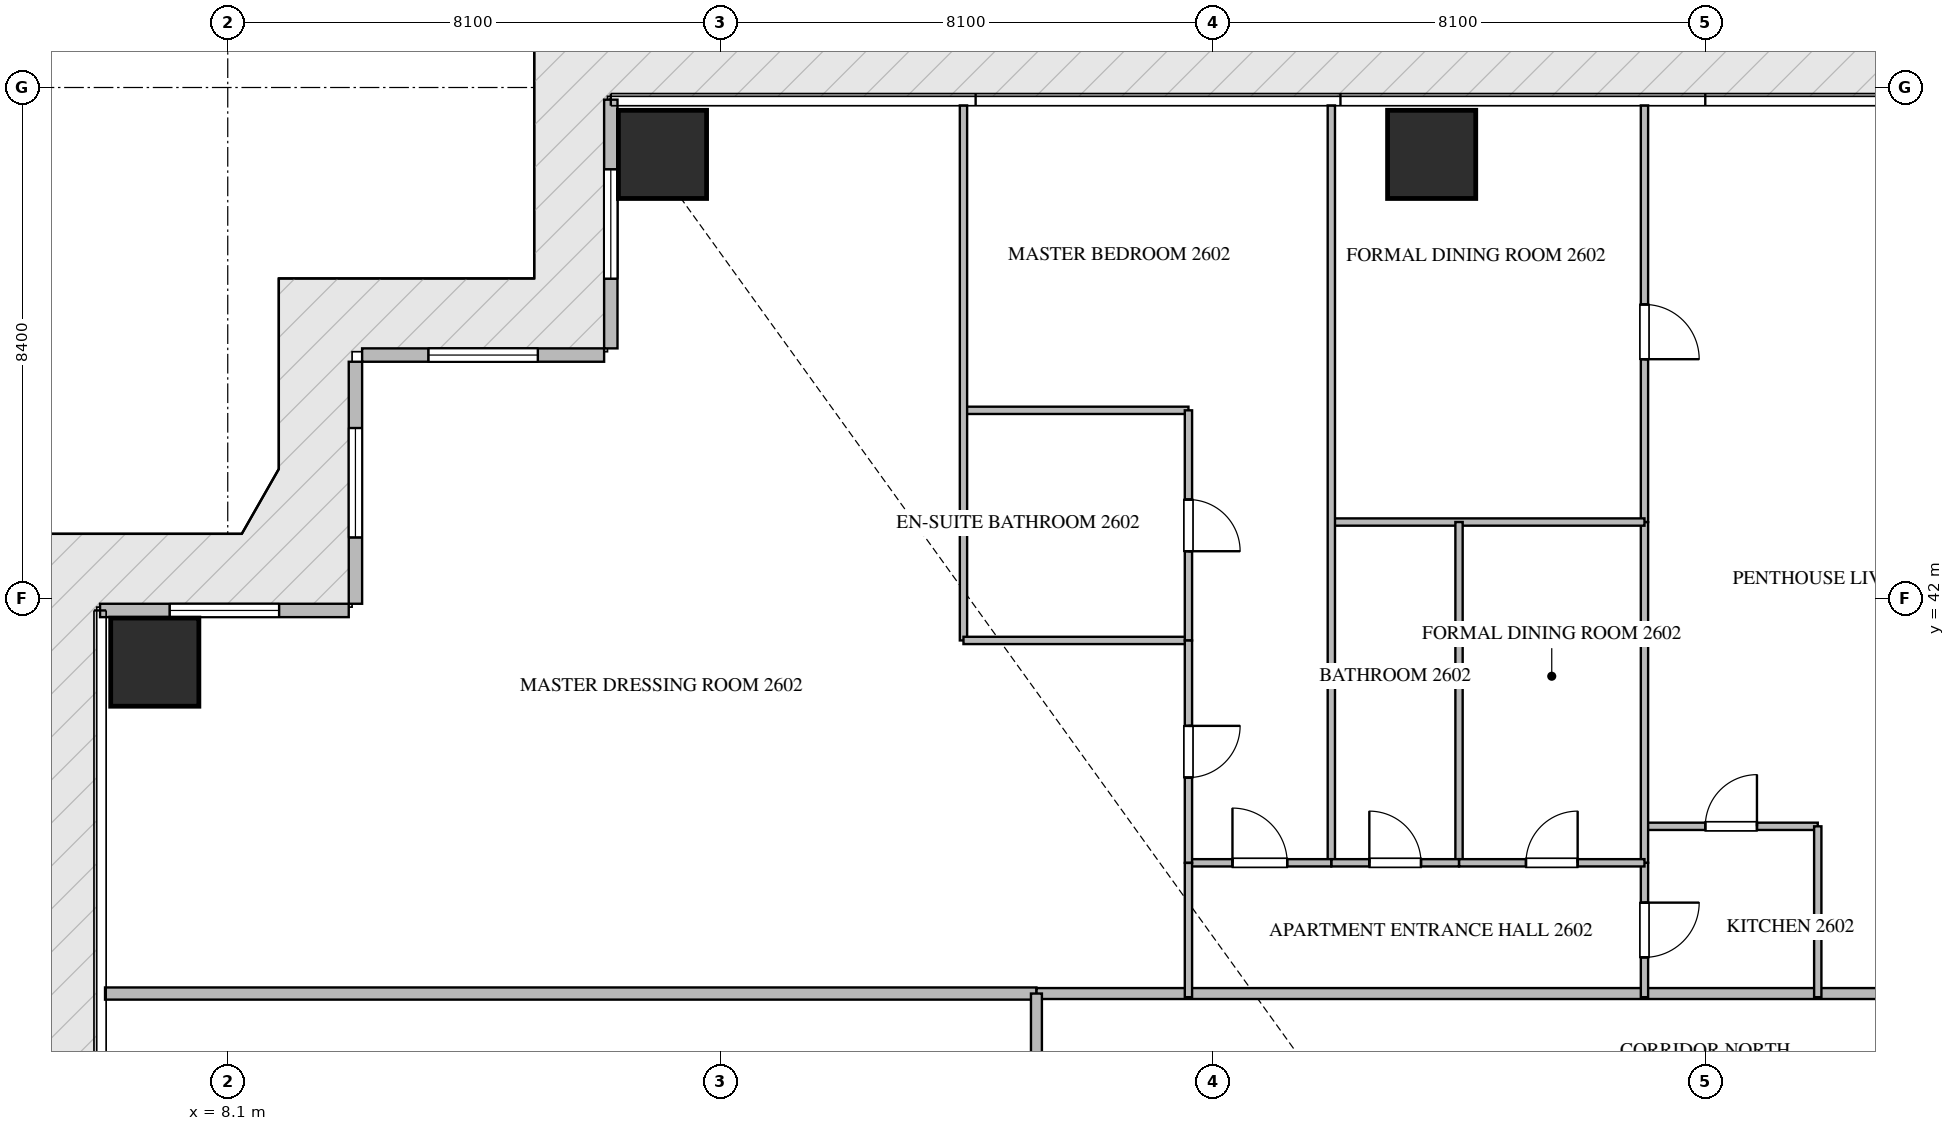
"""IFC4 building model, lengths in metres.
Left out: names, types, materials, properties, quantities, classifications, styles, units other than length and angle.
Written with IfcOpenShell. Run it as: python <this file> out.ifc"""

import sys

from ifc_helpers import new_model, si_unit, direction, frame, frame_2d, origin, origin_2d, place, context, subcontext, project, spatial, rectangle, extrude, source, transform, mapped, element, fill, save


model = new_model("IFC4")
c1 = context("Model", 3, precision=1e-05, world=origin(), true_north=direction((0.0, 1.0)))
c2 = subcontext(c1, "Body", "Model", "MODEL_VIEW")
j1 = project(units=[si_unit("LENGTHUNIT", "METRE"), si_unit("PLANEANGLEUNIT", "RADIAN")], contexts=[c1])
p1 = place(None, origin())
s1 = spatial("IfcSite", under=j1, at=p1, CompositionType="ELEMENT")
p2 = place(p1, origin())
s2 = spatial("IfcBuilding", under=s1, at=p2, CompositionType="ELEMENT")
p3 = place(p2, frame((0.0, 0.0, 105.45)))
s3 = spatial("IfcBuildingStorey", under=s2, at=p3, CompositionType="ELEMENT", Elevation=105.45)
m1 = source(origin(), c2, "Body", "SweptSolid", [
    extrude(rectangle(XDim=1.45, YDim=1.45, at=origin_2d()), origin(), (0.0, 0.0, 1.0), 3.65),
])
for number, where, z_axis, x_axis in (
    (1, (15.25, 49.3, -0.26), (0.0, 0.0, 1.0), (1.0, 0.0, 0.0)),
    (2, (27.9, 49.3, -0.26), (0.0, 0.0, 1.0), (1.0, 0.0, 0.0)),
    (3, (6.9, 40.95, -0.26), (0.0, 0.0, 1.0), (1.0, 0.0, 0.0)),
):
    element("IfcColumn", number, at=place(p3, frame(where, z_axis=z_axis, x_axis=x_axis)), inside=s3, PredefinedType="COLUMN", context=c2, shape_type="MappedRepresentation", body=[
        mapped(m1, transform((0.0, 0.0, 0.0), scale=1.0)),
    ])
p4 = place(p3, frame((14.4, 50.2, 0.0), z_axis=(0.0, 0.0, 1.0), x_axis=(0.0, -1.0, 0.0)))
e4 = element("IfcWall", 4, at=p4, inside=s3, PredefinedType="ELEMENTEDWALL", context=c2, shape_type="SweptSolid", body=[
    extrude(rectangle(XDim=4.09, YDim=0.22, at=frame_2d((2.045, 0.0))), origin(), (0.0, 0.0, 1.0), 3.375),
])
p5 = place(p4, frame((1.145, 0.0, 0.65)))
e5 = element("IfcOpeningElement", 5, at=p5, cuts=e4, PredefinedType="OPENING", context=c2, shape_type="SweptSolid", body=[
    extrude(rectangle(XDim=1.8, YDim=2.1, at=frame_2d((0.9, 1.05))), frame((0.0, 0.12, 0.0), z_axis=(0.0, -1.0, 0.0), x_axis=(1.0, 0.0, 0.0)), (0.0, 0.0, 1.0), 0.24),
])
p6 = place(p3, frame((14.29, 46.0, 0.0), z_axis=(0.0, 0.0, 1.0), x_axis=(-1.0, 0.0, 0.0)))
e6 = element("IfcWall", 6, at=p6, inside=s3, PredefinedType="ELEMENTEDWALL", context=c2, shape_type="SweptSolid", body=[
    extrude(rectangle(XDim=3.98, YDim=0.22, at=frame_2d((1.99, 0.0))), origin(), (0.0, 0.0, 1.0), 3.375),
])
p7 = place(p6, frame((1.09, 0.0, 0.65)))
e7 = element("IfcOpeningElement", 7, at=p7, cuts=e6, PredefinedType="OPENING", context=c2, shape_type="SweptSolid", body=[
    extrude(rectangle(XDim=1.8, YDim=2.1, at=frame_2d((0.9, 1.05))), frame((0.0, 0.12, 0.0), z_axis=(0.0, -1.0, 0.0), x_axis=(1.0, 0.0, 0.0)), (0.0, 0.0, 1.0), 0.24),
])
p8 = place(p3, frame((10.2, 45.89, 0.0), z_axis=(0.0, 0.0, 1.0), x_axis=(0.0, -1.0, 0.0)))
e8 = element("IfcWall", 8, at=p8, inside=s3, PredefinedType="ELEMENTEDWALL", context=c2, shape_type="SweptSolid", body=[
    extrude(rectangle(XDim=3.98, YDim=0.22, at=frame_2d((1.99, 0.0))), origin(), (0.0, 0.0, 1.0), 3.375),
])
p9 = place(p8, frame((1.09, 0.0, 0.65)))
e9 = element("IfcOpeningElement", 9, at=p9, cuts=e8, PredefinedType="OPENING", context=c2, shape_type="SweptSolid", body=[
    extrude(rectangle(XDim=1.8, YDim=2.1, at=frame_2d((0.9, 1.05))), frame((0.0, 0.12, 0.0), z_axis=(0.0, -1.0, 0.0), x_axis=(1.0, 0.0, 0.0)), (0.0, 0.0, 1.0), 0.24),
])
p10 = place(p3, frame((10.09, 41.8, 0.0), z_axis=(0.0, 0.0, 1.0), x_axis=(-1.0, 0.0, 0.0)))
e10 = element("IfcWall", 10, at=p10, inside=s3, PredefinedType="ELEMENTEDWALL", context=c2, shape_type="SweptSolid", body=[
    extrude(rectangle(XDim=4.09, YDim=0.22, at=frame_2d((2.045, 0.0))), origin(), (0.0, 0.0, 1.0), 3.375),
])
p11 = place(p10, frame((1.145, 0.0, 0.65)))
e11 = element("IfcOpeningElement", 11, at=p11, cuts=e10, PredefinedType="OPENING", context=c2, shape_type="SweptSolid", body=[
    extrude(rectangle(XDim=1.8, YDim=2.1, at=frame_2d((0.9, 1.05))), frame((0.0, 0.12, 0.0), z_axis=(0.0, -1.0, 0.0), x_axis=(1.0, 0.0, 0.0)), (0.0, 0.0, 1.0), 0.24),
])
p12 = place(p3, frame((6.082, 35.5, 0.0), z_axis=(0.0, 0.0, 1.0), x_axis=(1.0, 0.0, 0.0)))
e12 = element("IfcWall", 12, at=p12, inside=s3, PredefinedType="PARTITIONING", context=c2, shape_type="SweptSolid", body=[
    extrude(rectangle(XDim=15.318, YDim=0.2, at=frame_2d((7.659, 0.0))), origin(), (0.0, 0.0, 1.0), 3.39),
])
p13 = place(p3, frame((21.402, 35.5, 0.0), z_axis=(0.0, 0.0, 1.0), x_axis=(1.0, 0.0, 0.0)))
e13 = element("IfcWall", 13, at=p13, inside=s3, PredefinedType="PARTITIONING", context=c2, shape_type="SweptSolid", body=[
    extrude(rectangle(XDim=21.996, YDim=0.18, at=frame_2d((10.998, 0.0))), origin(), (0.0, 0.0, 1.0), 3.39),
])
p14 = place(p13, frame((15.222, 0.0, 0.0)))
e14 = element("IfcOpeningElement", 14, at=p14, cuts=e13, PredefinedType="OPENING", context=c2, shape_type="SweptSolid", body=[
    extrude(rectangle(XDim=1.0, YDim=2.15, at=frame_2d((0.5, 1.075))), frame((0.0, 0.1, 0.0), z_axis=(0.0, -1.0, 0.0), x_axis=(1.0, 0.0, 0.0)), (0.0, 0.0, 1.0), 0.2),
])
p15 = place(p3, frame((21.4, 14.9, 0.0), z_axis=(0.0, 0.0, 1.0), x_axis=(0.0, 1.0, 0.0)))
e15 = element("IfcWall", 15, at=p15, inside=s3, PredefinedType="PARTITIONING", context=c2, shape_type="SweptSolid", body=[
    extrude(rectangle(XDim=20.6, YDim=0.18, at=frame_2d((10.3, 0.0))), origin(), (0.0, 0.0, 1.0), 3.39),
])
p16 = place(p15, frame((1.82, 0.0, 0.0)))
e16 = element("IfcOpeningElement", 16, at=p16, cuts=e15, PredefinedType="OPENING", context=c2, shape_type="SweptSolid", body=[
    extrude(rectangle(XDim=1.0, YDim=2.15, at=frame_2d((0.5, 1.075))), frame((0.0, 0.1, 0.0), z_axis=(0.0, -1.0, 0.0), x_axis=(1.0, 0.0, 0.0)), (0.0, 0.0, 1.0), 0.2),
])
p17 = place(p15, frame((11.27, 0.0, 0.0)))
e17 = element("IfcOpeningElement", 17, at=p17, cuts=e15, PredefinedType="OPENING", context=c2, shape_type="SweptSolid", body=[
    extrude(rectangle(XDim=1.0, YDim=2.15, at=frame_2d((0.5, 1.075))), frame((0.0, 0.1, 0.0), z_axis=(0.0, -1.0, 0.0), x_axis=(1.0, 0.0, 0.0)), (0.0, 0.0, 1.0), 0.2),
])
p18 = place(p15, frame((17.92, 0.0, 0.0)))
e18 = element("IfcOpeningElement", 18, at=p18, cuts=e15, PredefinedType="OPENING", context=c2, shape_type="SweptSolid", body=[
    extrude(rectangle(XDim=1.0, YDim=2.15, at=frame_2d((0.5, 1.075))), frame((0.0, 0.1, 0.0), z_axis=(0.0, -1.0, 0.0), x_axis=(1.0, 0.0, 0.0)), (0.0, 0.0, 1.0), 0.2),
])
p19 = place(p3, frame((31.4, 38.25, 0.0), z_axis=(0.0, 0.0, 1.0), x_axis=(1.0, 0.0, 0.0)))
e19 = element("IfcWall", 19, at=p19, inside=s3, PredefinedType="PARTITIONING", context=c2, shape_type="SweptSolid", body=[
    extrude(rectangle(XDim=2.85, YDim=0.12, at=frame_2d((1.425, 0.0))), origin(), (0.0, 0.0, 1.0), 3.39),
])
p20 = place(p19, frame((1.0, 0.0, 0.0)))
e20 = element("IfcOpeningElement", 20, at=p20, cuts=e19, PredefinedType="OPENING", context=c2, shape_type="SweptSolid", body=[
    extrude(rectangle(XDim=0.85, YDim=2.1, at=frame_2d((0.425, 1.05))), frame((0.0, 0.07, 0.0), z_axis=(0.0, -1.0, 0.0), x_axis=(1.0, 0.0, 0.0)), (0.0, 0.0, 1.0), 0.14),
])
p21 = place(p3, frame((34.25, 38.25, 0.0), z_axis=(0.0, 0.0, 1.0), x_axis=(0.0, -1.0, 0.0)))
e21 = element("IfcWall", 21, at=p21, inside=s3, PredefinedType="PARTITIONING", context=c2, shape_type="SweptSolid", body=[
    extrude(rectangle(XDim=2.81, YDim=0.12, at=frame_2d((1.405, 0.0))), origin(), (0.0, 0.0, 1.0), 3.39),
])
p22 = place(p3, frame((31.4, 37.65, 0.0), z_axis=(0.0, 0.0, 1.0), x_axis=(0.0, -1.0, 0.0)))
e22 = element("IfcWall", 22, at=p22, inside=s3, PredefinedType="PARTITIONING", context=c2, shape_type="SweptSolid", body=[
    extrude(rectangle(XDim=2.21, YDim=0.12, at=frame_2d((1.105, 0.0))), origin(), (0.0, 0.0, 1.0), 3.39),
])
p23 = place(p22, frame((0.655, 0.0, 0.0)))
e23 = element("IfcOpeningElement", 23, at=p23, cuts=e22, PredefinedType="OPENING", context=c2, shape_type="SweptSolid", body=[
    extrude(rectangle(XDim=0.9, YDim=2.1, at=frame_2d((0.45, 1.05))), frame((0.0, 0.07, 0.0), z_axis=(0.0, -1.0, 0.0), x_axis=(1.0, 0.0, 0.0)), (0.0, 0.0, 1.0), 0.14),
])
p24 = place(p3, frame((31.4, 50.105, 0.0), z_axis=(0.0, 0.0, 1.0), x_axis=(0.0, -1.0, 0.0)))
e24 = element("IfcWall", 24, at=p24, inside=s3, PredefinedType="PARTITIONING", context=c2, shape_type="SweptSolid", body=[
    extrude(rectangle(XDim=6.851, YDim=0.12, at=frame_2d((3.426, 0.0))), origin(), (0.0, 0.0, 1.0), 3.39),
])
p25 = place(p24, frame((3.273, 0.0, 0.0)))
e25 = element("IfcOpeningElement", 25, at=p25, cuts=e24, PredefinedType="OPENING", context=c2, shape_type="SweptSolid", body=[
    extrude(rectangle(XDim=0.9, YDim=2.1, at=frame_2d((0.45, 1.05))), frame((0.0, 0.07, 0.0), z_axis=(0.0, -1.0, 0.0), x_axis=(1.0, 0.0, 0.0)), (0.0, 0.0, 1.0), 0.14),
])
p26 = place(p3, frame((31.4, 43.252, 0.0), z_axis=(0.0, 0.0, 1.0), x_axis=(0.0, -1.0, 0.0)))
e26 = element("IfcWall", 26, at=p26, inside=s3, PredefinedType="PARTITIONING", context=c2, shape_type="SweptSolid", body=[
    extrude(rectangle(XDim=5.6, YDim=0.12, at=frame_2d((2.8, 0.0))), origin(), (0.0, 0.0, 1.0), 3.39),
])
p27 = place(p3, frame((26.25, 43.254, 0.0), z_axis=(0.0, 0.0, 1.0), x_axis=(1.0, 0.0, 0.0)))
e27 = element("IfcWall", 27, at=p27, inside=s3, PredefinedType="PARTITIONING", context=c2, shape_type="SweptSolid", body=[
    extrude(rectangle(XDim=5.15, YDim=0.12, at=frame_2d((2.575, 0.0))), origin(), (0.0, 0.0, 1.0), 3.39),
])
p28 = place(p3, frame((26.25, 50.105, 0.0), z_axis=(0.0, 0.0, 1.0), x_axis=(0.0, -1.0, 0.0)))
e28 = element("IfcWall", 28, at=p28, inside=s3, PredefinedType="PARTITIONING", context=c2, shape_type="SweptSolid", body=[
    extrude(rectangle(XDim=12.455, YDim=0.12, at=frame_2d((6.228, 0.0))), origin(), (0.0, 0.0, 1.0), 3.39),
])
p29 = place(p3, frame((28.35, 43.254, 0.0), z_axis=(0.0, 0.0, 1.0), x_axis=(0.0, -1.0, 0.0)))
e29 = element("IfcWall", 29, at=p29, inside=s3, PredefinedType="PARTITIONING", context=c2, shape_type="SweptSolid", body=[
    extrude(rectangle(XDim=5.604, YDim=0.12, at=frame_2d((2.802, 0.0))), origin(), (0.0, 0.0, 1.0), 3.39),
])
p30 = place(p3, frame((26.25, 37.65, 0.0), z_axis=(0.0, 0.0, 1.0), x_axis=(1.0, 0.0, 0.0)))
e30 = element("IfcWall", 30, at=p30, inside=s3, PredefinedType="PARTITIONING", context=c2, shape_type="SweptSolid", body=[
    extrude(rectangle(XDim=2.1, YDim=0.12, at=frame_2d((1.05, 0.0))), origin(), (0.0, 0.0, 1.0), 3.39),
])
p31 = place(p30, frame((0.625, 0.0, 0.0)))
e31 = element("IfcOpeningElement", 31, at=p31, cuts=e30, PredefinedType="OPENING", context=c2, shape_type="SweptSolid", body=[
    extrude(rectangle(XDim=0.85, YDim=2.1, at=frame_2d((0.425, 1.05))), frame((0.0, 0.07, 0.0), z_axis=(0.0, -1.0, 0.0), x_axis=(1.0, 0.0, 0.0)), (0.0, 0.0, 1.0), 0.14),
])
p32 = place(p3, frame((28.352, 37.65, 0.0), z_axis=(0.0, 0.0, 1.0), x_axis=(1.0, 0.0, 0.0)))
e32 = element("IfcWall", 32, at=p32, inside=s3, PredefinedType="PARTITIONING", context=c2, shape_type="SweptSolid", body=[
    extrude(rectangle(XDim=3.048, YDim=0.12, at=frame_2d((1.524, 0.0))), origin(), (0.0, 0.0, 1.0), 3.39),
])
p33 = place(p32, frame((1.099, 0.0, 0.0)))
e33 = element("IfcOpeningElement", 33, at=p33, cuts=e32, PredefinedType="OPENING", context=c2, shape_type="SweptSolid", body=[
    extrude(rectangle(XDim=0.85, YDim=2.1, at=frame_2d((0.425, 1.05))), frame((0.0, 0.07, 0.0), z_axis=(0.0, -1.0, 0.0), x_axis=(1.0, 0.0, 0.0)), (0.0, 0.0, 1.0), 0.14),
])
p34 = place(p3, frame((23.9, 37.65, 0.0), z_axis=(0.0, 0.0, 1.0), x_axis=(1.0, 0.0, 0.0)))
e34 = element("IfcWall", 34, at=p34, inside=s3, PredefinedType="PARTITIONING", context=c2, shape_type="SweptSolid", body=[
    extrude(rectangle(XDim=2.348, YDim=0.12, at=frame_2d((1.174, 0.0))), origin(), (0.0, 0.0, 1.0), 3.39),
])
p35 = place(p34, frame((0.724, 0.0, 0.0)))
e35 = element("IfcOpeningElement", 35, at=p35, cuts=e34, PredefinedType="OPENING", context=c2, shape_type="SweptSolid", body=[
    extrude(rectangle(XDim=0.9, YDim=2.1, at=frame_2d((0.45, 1.05))), frame((0.0, 0.07, 0.0), z_axis=(0.0, -1.0, 0.0), x_axis=(1.0, 0.0, 0.0)), (0.0, 0.0, 1.0), 0.14),
])
p36 = place(p3, frame((20.2, 45.091, 0.0), z_axis=(0.0, 0.0, 1.0), x_axis=(1.0, 0.0, 0.0)))
e36 = element("IfcWall", 36, at=p36, inside=s3, PredefinedType="PARTITIONING", context=c2, shape_type="SweptSolid", body=[
    extrude(rectangle(XDim=3.7, YDim=0.12, at=frame_2d((1.85, 0.0))), origin(), (0.0, 0.0, 1.0), 3.39),
])
p37 = place(p3, frame((20.2, 50.105, 0.0), z_axis=(0.0, 0.0, 1.0), x_axis=(0.0, -1.0, 0.0)))
e37 = element("IfcWall", 37, at=p37, inside=s3, PredefinedType="PARTITIONING", context=c2, shape_type="SweptSolid", body=[
    extrude(rectangle(XDim=8.798, YDim=0.12, at=frame_2d((4.399, 0.0))), origin(), (0.0, 0.0, 1.0), 3.39),
])
p38 = place(p3, frame((20.2, 41.307, 0.0), z_axis=(0.0, 0.0, 1.0), x_axis=(1.0, 0.0, 0.0)))
e38 = element("IfcWall", 38, at=p38, inside=s3, PredefinedType="PARTITIONING", context=c2, shape_type="SweptSolid", body=[
    extrude(rectangle(XDim=3.7, YDim=0.12, at=frame_2d((1.85, 0.0))), origin(), (0.0, 0.0, 1.0), 3.39),
])
p39 = place(p3, frame((23.9, 45.091, 0.0), z_axis=(0.0, 0.0, 1.0), x_axis=(0.0, -1.0, 0.0)))
e39 = element("IfcWall", 39, at=p39, inside=s3, PredefinedType="PARTITIONING", context=c2, shape_type="SweptSolid", body=[
    extrude(rectangle(XDim=3.784, YDim=0.12, at=frame_2d((1.892, 0.0))), origin(), (0.0, 0.0, 1.0), 3.39),
])
p40 = place(p39, frame((1.467, 0.0, 0.0)))
e40 = element("IfcOpeningElement", 40, at=p40, cuts=e39, PredefinedType="OPENING", context=c2, shape_type="SweptSolid", body=[
    extrude(rectangle(XDim=0.85, YDim=2.1, at=frame_2d((0.425, 1.05))), frame((0.0, 0.07, 0.0), z_axis=(0.0, -1.0, 0.0), x_axis=(1.0, 0.0, 0.0)), (0.0, 0.0, 1.0), 0.14),
])
p41 = place(p3, frame((23.9, 41.305, 0.0), z_axis=(0.0, 0.0, 1.0), x_axis=(0.0, -1.0, 0.0)))
e41 = element("IfcWall", 41, at=p41, inside=s3, PredefinedType="PARTITIONING", context=c2, shape_type="SweptSolid", body=[
    extrude(rectangle(XDim=3.655, YDim=0.12, at=frame_2d((1.828, 0.0))), origin(), (0.0, 0.0, 1.0), 3.39),
])
p42 = place(p41, frame((1.403, 0.0, 0.0)))
e42 = element("IfcOpeningElement", 42, at=p42, cuts=e41, PredefinedType="OPENING", context=c2, shape_type="SweptSolid", body=[
    extrude(rectangle(XDim=0.85, YDim=2.1, at=frame_2d((0.425, 1.05))), frame((0.0, 0.07, 0.0), z_axis=(0.0, -1.0, 0.0), x_axis=(1.0, 0.0, 0.0)), (0.0, 0.0, 1.0), 0.14),
])
p43 = place(p3, frame((23.9, 37.648, 0.0), z_axis=(0.0, 0.0, 1.0), x_axis=(0.0, -1.0, 0.0)))
e43 = element("IfcWall", 43, at=p43, inside=s3, PredefinedType="PARTITIONING", context=c2, shape_type="SweptSolid", body=[
    extrude(rectangle(XDim=2.208, YDim=0.12, at=frame_2d((1.104, 0.0))), origin(), (0.0, 0.0, 1.0), 3.39),
])
m2 = source(origin(), c2, "Body", "SweptSolid", [
    extrude(rectangle(XDim=1.8, YDim=2.1, at=frame_2d((0.9, 1.05))), frame((0.0, 0.03, 0.0), z_axis=(0.0, -1.0, 0.0), x_axis=(1.0, 0.0, 0.0)), (0.0, 0.0, 1.0), 0.06),
])
p44 = place(p5, origin())
e44 = element("IfcWindow", 44, at=p44, inside=s3, PartitioningType="SINGLE_PANEL", PredefinedType="WINDOW", context=c2, shape_type="MappedRepresentation", body=[
    mapped(m2, transform((0.0, 0.0, 0.0), scale=1.0)),
])
fill(e5, e44)
p45 = place(p7, origin())
e45 = element("IfcWindow", 45, at=p45, inside=s3, PartitioningType="SINGLE_PANEL", PredefinedType="WINDOW", context=c2, shape_type="MappedRepresentation", body=[
    mapped(m2, transform((0.0, 0.0, 0.0), scale=1.0)),
])
fill(e7, e45)
p46 = place(p9, origin())
e46 = element("IfcWindow", 46, at=p46, inside=s3, PartitioningType="SINGLE_PANEL", PredefinedType="WINDOW", context=c2, shape_type="MappedRepresentation", body=[
    mapped(m2, transform((0.0, 0.0, 0.0), scale=1.0)),
])
fill(e9, e46)
p47 = place(p11, origin())
e47 = element("IfcWindow", 47, at=p47, inside=s3, PartitioningType="SINGLE_PANEL", PredefinedType="WINDOW", context=c2, shape_type="MappedRepresentation", body=[
    mapped(m2, transform((0.0, 0.0, 0.0), scale=1.0)),
])
fill(e11, e47)
m3 = source(origin(), c2, "Body", "SweptSolid", [
    extrude(rectangle(XDim=0.85, YDim=2.1, at=frame_2d((0.425, 1.05))), frame((0.0, 0.025, 0.0), z_axis=(0.0, -1.0, 0.0), x_axis=(1.0, 0.0, 0.0)), (0.0, 0.0, 1.0), 0.05),
])
p48 = place(p20, origin())
e48 = element("IfcDoor", 48, at=p48, inside=s3, OperationType="SINGLE_SWING_RIGHT", PredefinedType="DOOR", context=c2, shape_type="MappedRepresentation", body=[
    mapped(m3, transform((0.0, 0.0, 0.0), scale=1.0)),
])
fill(e20, e48)
m4 = source(origin(), c2, "Body", "SweptSolid", [
    extrude(rectangle(XDim=0.9, YDim=2.1, at=frame_2d((0.45, 1.05))), frame((0.0, 0.025, 0.0), z_axis=(0.0, -1.0, 0.0), x_axis=(1.0, 0.0, 0.0)), (0.0, 0.0, 1.0), 0.05),
])
p49 = place(p23, origin())
e49 = element("IfcDoor", 49, at=p49, inside=s3, OperationType="SINGLE_SWING_LEFT", PredefinedType="DOOR", context=c2, shape_type="MappedRepresentation", body=[
    mapped(m4, transform((0.0, 0.0, 0.0), scale=1.0)),
])
fill(e23, e49)
p50 = place(p25, origin())
e50 = element("IfcDoor", 50, at=p50, inside=s3, OperationType="SINGLE_SWING_RIGHT", PredefinedType="DOOR", context=c2, shape_type="MappedRepresentation", body=[
    mapped(m4, transform((0.0, 0.0, 0.0), scale=1.0)),
])
fill(e25, e50)
p51 = place(p31, origin())
e51 = element("IfcDoor", 51, at=p51, inside=s3, OperationType="SINGLE_SWING_LEFT", PredefinedType="DOOR", context=c2, shape_type="MappedRepresentation", body=[
    mapped(m3, transform((0.0, 0.0, 0.0), scale=1.0)),
])
fill(e31, e51)
p52 = place(p33, origin())
e52 = element("IfcDoor", 52, at=p52, inside=s3, OperationType="SINGLE_SWING_RIGHT", PredefinedType="DOOR", context=c2, shape_type="MappedRepresentation", body=[
    mapped(m3, transform((0.0, 0.0, 0.0), scale=1.0)),
])
fill(e33, e52)
p53 = place(p35, origin())
e53 = element("IfcDoor", 53, at=p53, inside=s3, OperationType="SINGLE_SWING_LEFT", PredefinedType="DOOR", context=c2, shape_type="MappedRepresentation", body=[
    mapped(m4, transform((0.0, 0.0, 0.0), scale=1.0)),
])
fill(e35, e53)
p54 = place(p40, origin())
e54 = element("IfcDoor", 54, at=p54, inside=s3, OperationType="SINGLE_SWING_RIGHT", PredefinedType="DOOR", context=c2, shape_type="MappedRepresentation", body=[
    mapped(m3, transform((0.0, 0.0, 0.0), scale=1.0)),
])
fill(e40, e54)
p55 = place(p42, origin())
e55 = element("IfcDoor", 55, at=p55, inside=s3, OperationType="SINGLE_SWING_LEFT", PredefinedType="DOOR", context=c2, shape_type="MappedRepresentation", body=[
    mapped(m3, transform((0.0, 0.0, 0.0), scale=1.0)),
])
fill(e42, e55)
save(model, sys.argv[1])
